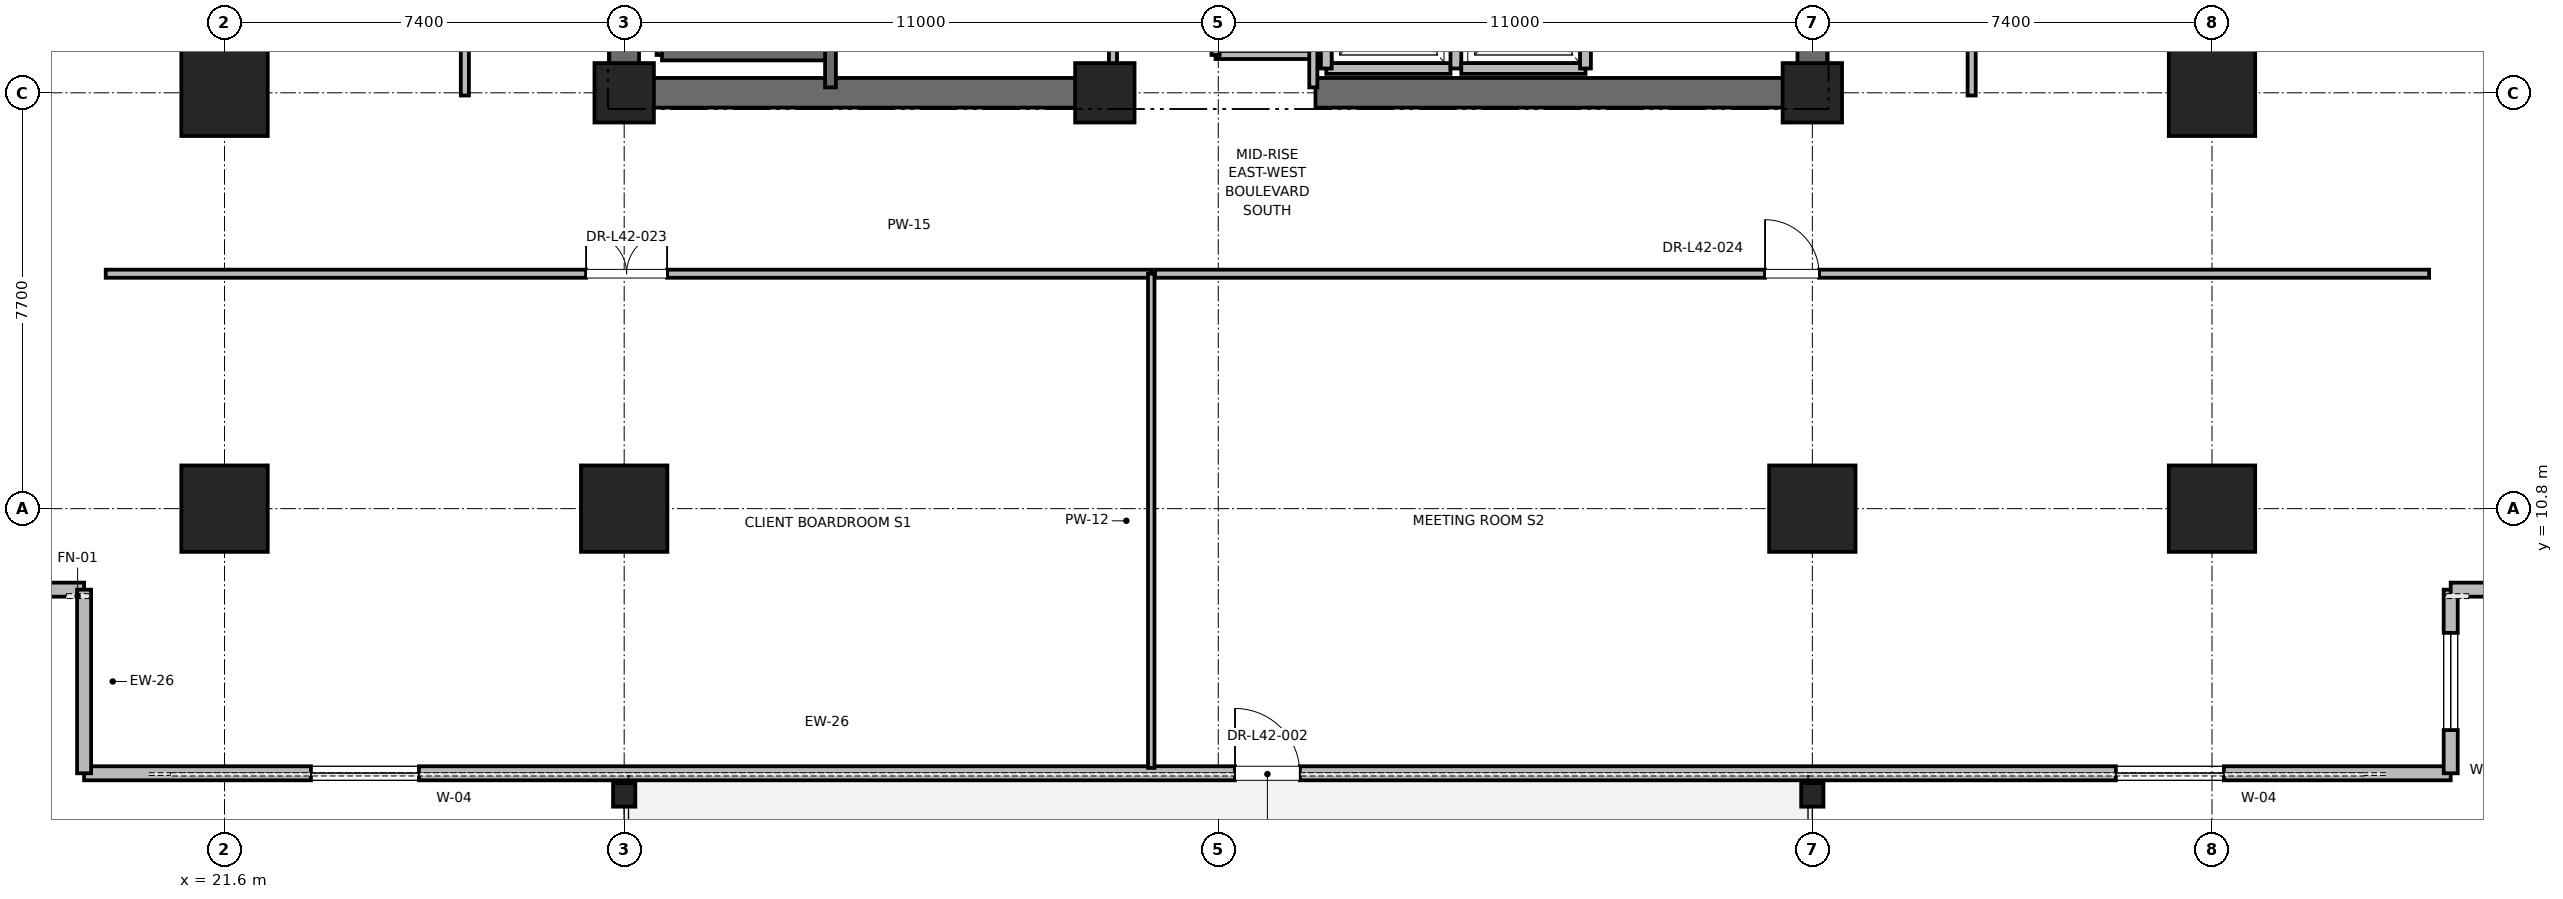
"""IFC4 building model, lengths in metres.
Left out: names, types, materials, properties, quantities, classifications, styles, units other than length and angle.
Written with IfcOpenShell. Run it as: python <this file> out.ifc"""

import sys

from ifc_helpers import new_model, si_unit, direction, frame, frame_2d, origin, origin_2d, place, context, subcontext, project, spatial, rectangle, i_section, extrude, element, fill, save


model = new_model("IFC4")
c1 = context("Model", 3, precision=1e-05, world=origin(), true_north=direction((0.0, 1.0)))
c2 = subcontext(c1, "Body", "Model", "MODEL_VIEW")
j1 = project(units=[si_unit("LENGTHUNIT", "METRE"), si_unit("PLANEANGLEUNIT", "RADIAN")], contexts=[c1])
p1 = place(None, origin())
s1 = spatial("IfcSite", under=j1, at=p1, CompositionType="ELEMENT")
p2 = place(p1, origin())
s2 = spatial("IfcBuilding", under=s1, at=p2, CompositionType="ELEMENT")
p3 = place(p2, frame((0.0, 0.0, 180.4)))
s3 = spatial("IfcBuildingStorey", under=s2, at=p3, CompositionType="ELEMENT", Elevation=180.4)
for number, where, z_axis, x_axis in (
    (1, (29.0, 10.8, 0.0), (0.0, 0.0, 1.0), (1.0, 0.0, 0.0)),
    (2, (51.0, 10.8, 0.0), (0.0, 0.0, 1.0), (1.0, 0.0, 0.0)),
    (3, (21.6, 18.5, 0.0), (0.0, 0.0, 1.0), (1.0, 0.0, 0.0)),
    (4, (58.4, 18.5, 0.0), (0.0, 0.0, 1.0), (1.0, 0.0, 0.0)),
    (5, (21.6, 10.8, 0.0), (0.0, 0.0, 1.0), (1.0, 0.0, 0.0)),
    (6, (58.4, 10.8, 0.0), (0.0, 0.0, 1.0), (1.0, 0.0, 0.0)),
):
    element("IfcColumn", number, at=place(p3, frame(where, z_axis=z_axis, x_axis=x_axis)), inside=s3, PredefinedType="COLUMN", context=c2, shape_type="SweptSolid", body=[
        extrude(rectangle(XDim=1.6, YDim=1.6, at=origin_2d()), origin(), (0.0, 0.0, 1.0), 4.0),
    ])
for number, where, z_axis, x_axis in (
    (7, (29.0, 5.5, 0.0), (0.0, 0.0, 1.0), (1.0, 0.0, 0.0)),
    (8, (51.0, 5.5, 0.0), (0.0, 0.0, 1.0), (1.0, 0.0, 0.0)),
):
    element("IfcColumn", number, at=place(p3, frame(where, z_axis=z_axis, x_axis=x_axis)), inside=s3, PredefinedType="COLUMN", context=c2, shape_type="SweptSolid", body=[
        extrude(i_section(OverallWidth=0.412, OverallDepth=0.437, WebThickness=0.036, FlangeThickness=0.058, FilletRadius=0.015, at=origin_2d()), origin(), (0.0, 0.0, 1.0), 4.0),
    ])
for number, where, z_axis, x_axis in (
    (9, (29.0, 18.5, 0.0), (0.0, 0.0, 1.0), (1.0, 0.0, 0.0)),
    (10, (51.0, 18.5, 0.0), (0.0, 0.0, 1.0), (1.0, 0.0, 0.0)),
    (11, (37.9, 18.5, 0.0), (0.0, 0.0, 1.0), (1.0, 0.0, 0.0)),
):
    element("IfcColumn", number, at=place(p3, frame(where, z_axis=z_axis, x_axis=x_axis)), inside=s3, PredefinedType="PILASTER", context=c2, shape_type="SweptSolid", body=[
        extrude(rectangle(XDim=1.1, YDim=1.1, at=origin_2d()), origin(), (0.0, 0.0, 1.0), 4.0),
    ])
for number, where, z_axis, x_axis in (
    (12, (29.0, 18.5, 0.0), (0.0, 0.0, 1.0), (1.0, 0.0, 0.0)),
    (13, (41.8, 18.5, 0.0), (0.0, 0.0, 1.0), (1.0, 0.0, 0.0)),
):
    element("IfcWall", number, at=place(p3, frame(where, z_axis=z_axis, x_axis=x_axis)), inside=s3, PredefinedType="SHEAR", context=c2, shape_type="SweptSolid", body=[
        extrude(rectangle(XDim=9.2, YDim=0.55, at=frame_2d((4.6, 0.0))), origin(), (0.0, 0.0, 1.0), 3.7),
    ])
p4 = place(p3, frame((29.0, 18.5, 0.0), z_axis=(0.0, 0.0, 1.0), x_axis=(0.0, 1.0, 0.0)))
e14 = element("IfcWall", 14, at=p4, inside=s3, PredefinedType="SHEAR", context=c2, shape_type="SweptSolid", body=[
    extrude(rectangle(XDim=8.8, YDim=0.55, at=frame_2d((4.4, 0.0))), origin(), (0.0, 0.0, 1.0), 3.7),
])
p5 = place(p3, frame((51.0, 18.5, 0.0), z_axis=(0.0, 0.0, 1.0), x_axis=(0.0, 1.0, 0.0)))
e15 = element("IfcWall", 15, at=p5, inside=s3, PredefinedType="SHEAR", context=c2, shape_type="SweptSolid", body=[
    extrude(rectangle(XDim=5.8, YDim=0.55, at=frame_2d((2.9, 0.0))), origin(), (0.0, 0.0, 1.0), 3.7),
])
p6 = place(p3, frame((19.0, 5.9, 0.0), z_axis=(0.0, 0.0, 1.0), x_axis=(1.0, 0.0, 0.0)))
e16 = element("IfcWall", 16, at=p6, inside=s3, PredefinedType="PARAPET", context=c2, shape_type="SweptSolid", body=[
    extrude(rectangle(XDim=43.82, YDim=0.26, at=frame_2d((21.91, 0.0))), origin(), (0.0, 0.0, 1.0), 2.91),
])
p7 = place(p6, frame((4.2, 0.0, 0.85)))
e17 = element("IfcOpeningElement", 17, at=p7, cuts=e16, PredefinedType="OPENING", context=c2, shape_type="SweptSolid", body=[
    extrude(rectangle(XDim=2.0, YDim=2.3, at=frame_2d((1.0, 1.15))), frame((0.0, 0.13, 0.0), z_axis=(0.0, -1.0, 0.0), x_axis=(1.0, 0.0, 0.0)), (0.0, 0.0, 1.0), 0.26),
])
p8 = place(p6, frame((21.31, 0.0, 0.0)))
e18 = element("IfcOpeningElement", 18, at=p8, cuts=e16, PredefinedType="OPENING", context=c2, shape_type="SweptSolid", body=[
    extrude(rectangle(XDim=1.2, YDim=2.2, at=frame_2d((0.6, 1.1))), frame((0.0, 0.13, 0.0), z_axis=(0.0, -1.0, 0.0), x_axis=(1.0, 0.0, 0.0)), (0.0, 0.0, 1.0), 0.26),
])
p9 = place(p6, frame((37.62, 0.0, 0.85)))
e19 = element("IfcOpeningElement", 19, at=p9, cuts=e16, PredefinedType="OPENING", context=c2, shape_type="SweptSolid", body=[
    extrude(rectangle(XDim=2.0, YDim=2.3, at=frame_2d((1.0, 1.15))), frame((0.0, 0.13, 0.0), z_axis=(0.0, -1.0, 0.0), x_axis=(1.0, 0.0, 0.0)), (0.0, 0.0, 1.0), 0.26),
])
p10 = place(p3, frame((15.2, 9.3, 0.0), z_axis=(0.0, 0.0, 1.0), x_axis=(1.0, 0.0, 0.0)))
e20 = element("IfcWall", 20, at=p10, inside=s3, PredefinedType="PARAPET", context=c2, shape_type="SweptSolid", body=[
    extrude(rectangle(XDim=3.8, YDim=0.26, at=frame_2d((1.9, 0.0))), origin(), (0.0, 0.0, 1.0), 3.7),
])
p11 = place(p10, frame((1.0, 0.0, 0.85)))
e21 = element("IfcOpeningElement", 21, at=p11, cuts=e20, PredefinedType="OPENING", context=c2, shape_type="SweptSolid", body=[
    extrude(rectangle(XDim=1.8, YDim=2.2, at=frame_2d((0.9, 1.1))), frame((0.0, 0.13, 0.0), z_axis=(0.0, -1.0, 0.0), x_axis=(1.0, 0.0, 0.0)), (0.0, 0.0, 1.0), 0.26),
])
p12 = place(p3, frame((19.0, 9.3, 0.0), z_axis=(0.0, 0.0, 1.0), x_axis=(0.0, -1.0, 0.0)))
e22 = element("IfcWall", 22, at=p12, inside=s3, PredefinedType="PARAPET", context=c2, shape_type="SweptSolid", body=[
    extrude(rectangle(XDim=3.4, YDim=0.26, at=frame_2d((1.7, 0.0))), origin(), (0.0, 0.0, 1.0), 3.7),
])
p13 = place(p3, frame((62.82, 5.9, 0.0), z_axis=(0.0, 0.0, 1.0), x_axis=(0.0, 1.0, 0.0)))
e23 = element("IfcWall", 23, at=p13, inside=s3, PredefinedType="PARAPET", context=c2, shape_type="SweptSolid", body=[
    extrude(rectangle(XDim=3.4, YDim=0.26, at=frame_2d((1.7, 0.0))), origin(), (0.0, 0.0, 1.0), 3.7),
])
p14 = place(p13, frame((0.8, 0.0, 0.85)))
e24 = element("IfcOpeningElement", 24, at=p14, cuts=e23, PredefinedType="OPENING", context=c2, shape_type="SweptSolid", body=[
    extrude(rectangle(XDim=1.8, YDim=2.2, at=frame_2d((0.9, 1.1))), frame((0.0, 0.13, 0.0), z_axis=(0.0, -1.0, 0.0), x_axis=(1.0, 0.0, 0.0)), (0.0, 0.0, 1.0), 0.26),
])
p15 = place(p3, frame((62.82, 9.3, 0.0), z_axis=(0.0, 0.0, 1.0), x_axis=(1.0, 0.0, 0.0)))
e25 = element("IfcWall", 25, at=p15, inside=s3, PredefinedType="PARAPET", context=c2, shape_type="SweptSolid", body=[
    extrude(rectangle(XDim=3.8, YDim=0.26, at=frame_2d((1.9, 0.0))), origin(), (0.0, 0.0, 1.0), 3.7),
])
p16 = place(p3, frame((29.7, 19.2, 0.0), z_axis=(0.0, 0.0, 1.0), x_axis=(0.0, 1.0, 0.0)))
e26 = element("IfcWall", 26, at=p16, inside=s3, PredefinedType="SOLIDWALL", context=c2, shape_type="SweptSolid", body=[
    extrude(rectangle(XDim=8.15, YDim=0.2, at=frame_2d((4.075, 0.0))), origin(), (0.0, 0.0, 1.0), 3.7),
])
p17 = place(p3, frame((29.7, 19.2, 0.0), z_axis=(0.0, 0.0, 1.0), x_axis=(1.0, 0.0, 0.0)))
e27 = element("IfcWall", 27, at=p17, inside=s3, PredefinedType="SOLIDWALL", context=c2, shape_type="SweptSolid", body=[
    extrude(rectangle(XDim=3.12, YDim=0.2, at=frame_2d((1.56, 0.0))), origin(), (0.0, 0.0, 1.0), 3.7),
])
p18 = place(p3, frame((32.82, 18.6, 0.0), z_axis=(0.0, 0.0, 1.0), x_axis=(0.0, 1.0, 0.0)))
e28 = element("IfcWall", 28, at=p18, inside=s3, PredefinedType="SOLIDWALL", context=c2, shape_type="SweptSolid", body=[
    extrude(rectangle(XDim=8.78, YDim=0.2, at=frame_2d((4.39, 0.0))), origin(), (0.0, 0.0, 1.0), 3.7),
])
p19 = place(p3, frame((42.0, 18.95, 0.0), z_axis=(0.0, 0.0, 1.0), x_axis=(1.0, 0.0, 0.0)))
e29 = element("IfcWall", 29, at=p19, inside=s3, PredefinedType="SOLIDWALL", context=c2, shape_type="SweptSolid", body=[
    extrude(rectangle(XDim=2.3, YDim=0.2, at=frame_2d((1.15, 0.0))), origin(), (0.0, 0.0, 1.0), 2.68),
])
p20 = place(p3, frame((42.0, 21.55, 0.0), z_axis=(0.0, 0.0, 1.0), x_axis=(0.0, -1.0, 0.0)))
e30 = element("IfcWall", 30, at=p20, inside=s3, PredefinedType="SOLIDWALL", context=c2, shape_type="SweptSolid", body=[
    extrude(rectangle(XDim=2.6, YDim=0.2, at=frame_2d((1.3, 0.0))), origin(), (0.0, 0.0, 1.0), 2.68),
])
p21 = place(p3, frame((44.4, 18.95, 0.0), z_axis=(0.0, 0.0, 1.0), x_axis=(0.0, 1.0, 0.0)))
e31 = element("IfcWall", 31, at=p21, inside=s3, PredefinedType="SOLIDWALL", context=c2, shape_type="SweptSolid", body=[
    extrude(rectangle(XDim=2.6, YDim=0.2, at=frame_2d((1.3, 0.0))), origin(), (0.0, 0.0, 1.0), 3.7),
])
p22 = place(p3, frame((44.5, 18.95, 0.0), z_axis=(0.0, 0.0, 1.0), x_axis=(1.0, 0.0, 0.0)))
e32 = element("IfcWall", 32, at=p22, inside=s3, PredefinedType="SOLIDWALL", context=c2, shape_type="SweptSolid", body=[
    extrude(rectangle(XDim=2.3, YDim=0.2, at=frame_2d((1.15, 0.0))), origin(), (0.0, 0.0, 1.0), 3.7),
])
p23 = place(p3, frame((46.8, 18.95, 0.0), z_axis=(0.0, 0.0, 1.0), x_axis=(0.0, 1.0, 0.0)))
e33 = element("IfcWall", 33, at=p23, inside=s3, PredefinedType="SOLIDWALL", context=c2, shape_type="SweptSolid", body=[
    extrude(rectangle(XDim=2.6, YDim=0.2, at=frame_2d((1.3, 0.0))), origin(), (0.0, 0.0, 1.0), 3.7),
])
p24 = place(p3, frame((39.95, 19.2, 0.0), z_axis=(0.0, 0.0, 1.0), x_axis=(1.0, 0.0, 0.0)))
e34 = element("IfcWall", 34, at=p24, inside=s3, PredefinedType="PARTITIONING", context=c2, shape_type="SweptSolid", body=[
    extrude(rectangle(XDim=1.81, YDim=0.15, at=frame_2d((0.905, 0.0))), origin(), (0.0, 0.0, 1.0), 2.85),
])
p25 = place(p3, frame((41.76, 18.6, 0.0), z_axis=(0.0, 0.0, 1.0), x_axis=(0.0, 1.0, 0.0)))
e35 = element("IfcWall", 35, at=p25, inside=s3, PredefinedType="PARTITIONING", context=c2, shape_type="SweptSolid", body=[
    extrude(rectangle(XDim=3.6, YDim=0.15, at=frame_2d((1.8, 0.0))), origin(), (0.0, 0.0, 1.0), 2.68),
])
p26 = place(p3, frame((39.95, 19.2, 0.0), z_axis=(0.0, 0.0, 1.0), x_axis=(0.0, 1.0, 0.0)))
e36 = element("IfcWall", 36, at=p26, inside=s3, PredefinedType="PARTITIONING", context=c2, shape_type="SweptSolid", body=[
    extrude(rectangle(XDim=3.0, YDim=0.15, at=frame_2d((1.5, 0.0))), origin(), (0.0, 0.0, 1.0), 2.85),
])
p27 = place(p26, frame((1.05, 0.0, 0.0)))
e37 = element("IfcOpeningElement", 37, at=p27, cuts=e36, PredefinedType="OPENING", context=c2, shape_type="SweptSolid", body=[
    extrude(rectangle(XDim=0.9, YDim=2.1, at=frame_2d((0.45, 1.05))), frame((0.0, 0.075, 0.0), z_axis=(0.0, -1.0, 0.0), x_axis=(1.0, 0.0, 0.0)), (0.0, 0.0, 1.0), 0.15),
])
p28 = place(p3, frame((38.05, 18.6, 0.0), z_axis=(0.0, 0.0, 1.0), x_axis=(0.0, 1.0, 0.0)))
e38 = element("IfcWall", 38, at=p28, inside=s3, PredefinedType="PARTITIONING", context=c2, shape_type="SweptSolid", body=[
    extrude(rectangle(XDim=4.46, YDim=0.15, at=frame_2d((2.23, 0.0))), origin(), (0.0, 0.0, 1.0), 2.68),
])
p29 = place(p28, frame((1.73, 0.0, 0.0)))
e39 = element("IfcOpeningElement", 39, at=p29, cuts=e38, PredefinedType="OPENING", context=c2, shape_type="SweptSolid", body=[
    extrude(rectangle(XDim=1.0, YDim=2.15, at=frame_2d((0.5, 1.075))), frame((0.0, 0.075, 0.0), z_axis=(0.0, -1.0, 0.0), x_axis=(1.0, 0.0, 0.0)), (0.0, 0.0, 1.0), 0.15),
])
p30 = place(p3, frame((19.4, 15.15, 0.0), z_axis=(0.0, 0.0, 1.0), x_axis=(1.0, 0.0, 0.0)))
e40 = element("IfcWall", 40, at=p30, inside=s3, PredefinedType="PARTITIONING", context=c2, shape_type="SweptSolid", body=[
    extrude(rectangle(XDim=19.359, YDim=0.15, at=frame_2d((9.68, 0.0))), origin(), (0.0, 0.0, 1.0), 2.85),
])
p31 = place(p30, frame((8.895, 0.0, 0.0)))
e41 = element("IfcOpeningElement", 41, at=p31, cuts=e40, PredefinedType="OPENING", context=c2, shape_type="SweptSolid", body=[
    extrude(rectangle(XDim=1.5, YDim=2.25, at=frame_2d((0.75, 1.125))), frame((0.0, 0.075, 0.0), z_axis=(0.0, -1.0, 0.0), x_axis=(1.0, 0.0, 0.0)), (0.0, 0.0, 1.0), 0.15),
])
p32 = place(p3, frame((38.759, 6.0, 0.0), z_axis=(0.0, 0.0, 1.0), x_axis=(0.0, 1.0, 0.0)))
e42 = element("IfcWall", 42, at=p32, inside=s3, PredefinedType="PARTITIONING", context=c2, shape_type="SweptSolid", body=[
    extrude(rectangle(XDim=9.15, YDim=0.12, at=frame_2d((4.575, 0.0))), origin(), (0.0, 0.0, 1.0), 2.33),
])
p33 = place(p3, frame((38.829, 15.15, 0.0), z_axis=(0.0, 0.0, 1.0), x_axis=(1.0, 0.0, 0.0)))
e43 = element("IfcWall", 43, at=p33, inside=s3, PredefinedType="PARTITIONING", context=c2, shape_type="SweptSolid", body=[
    extrude(rectangle(XDim=23.591, YDim=0.15, at=frame_2d((11.795, 0.0))), origin(), (0.0, 0.0, 1.0), 2.85),
])
p34 = place(p33, frame((11.295, 0.0, 0.0)))
e44 = element("IfcOpeningElement", 44, at=p34, cuts=e43, PredefinedType="OPENING", context=c2, shape_type="SweptSolid", body=[
    extrude(rectangle(XDim=1.0, YDim=2.15, at=frame_2d((0.5, 1.075))), frame((0.0, 0.075, 0.0), z_axis=(0.0, -1.0, 0.0), x_axis=(1.0, 0.0, 0.0)), (0.0, 0.0, 1.0), 0.15),
])
p35 = place(p3, frame((26.05, 18.45, 0.0), z_axis=(0.0, 0.0, 1.0), x_axis=(0.0, 1.0, 0.0)))
e45 = element("IfcWall", 45, at=p35, inside=s3, PredefinedType="PARTITIONING", context=c2, shape_type="SweptSolid", body=[
    extrude(rectangle(XDim=18.1, YDim=0.15, at=frame_2d((9.05, 0.0))), origin(), (0.0, 0.0, 1.0), 2.85),
])
p36 = place(p35, frame((8.55, 0.0, 0.0)))
e46 = element("IfcOpeningElement", 46, at=p36, cuts=e45, PredefinedType="OPENING", context=c2, shape_type="SweptSolid", body=[
    extrude(rectangle(XDim=1.0, YDim=2.15, at=frame_2d((0.5, 1.075))), frame((0.0, 0.075, 0.0), z_axis=(0.0, -1.0, 0.0), x_axis=(1.0, 0.0, 0.0)), (0.0, 0.0, 1.0), 0.15),
])
p37 = place(p3, frame((53.95, 18.45, 0.0), z_axis=(0.0, 0.0, 1.0), x_axis=(0.0, 1.0, 0.0)))
e47 = element("IfcWall", 47, at=p37, inside=s3, PredefinedType="PARTITIONING", context=c2, shape_type="SweptSolid", body=[
    extrude(rectangle(XDim=7.602, YDim=0.15, at=frame_2d((3.801, 0.0))), origin(), (0.0, 0.0, 1.0), 2.85),
])
p38 = place(p37, frame((3.341, 0.0, 0.0)))
e48 = element("IfcOpeningElement", 48, at=p38, cuts=e47, PredefinedType="OPENING", context=c2, shape_type="SweptSolid", body=[
    extrude(rectangle(XDim=1.0, YDim=2.15, at=frame_2d((0.5, 1.075))), frame((0.0, 0.075, 0.0), z_axis=(0.0, -1.0, 0.0), x_axis=(1.0, 0.0, 0.0)), (0.0, 0.0, 1.0), 0.15),
])
p39 = place(p7, origin())
e49 = element("IfcWindow", 49, at=p39, inside=s3, PartitioningType="SINGLE_PANEL", PredefinedType="WINDOW", context=c2, shape_type="SweptSolid", body=[
    extrude(rectangle(XDim=2.0, YDim=2.3, at=frame_2d((1.0, 1.15))), frame((0.0, 0.03, 0.0), z_axis=(0.0, -1.0, 0.0), x_axis=(1.0, 0.0, 0.0)), (0.0, 0.0, 1.0), 0.06),
])
fill(e17, e49)
p40 = place(p8, origin())
e50 = element("IfcDoor", 50, at=p40, inside=s3, OperationType="SINGLE_SWING_LEFT", PredefinedType="DOOR", context=c2, shape_type="SweptSolid", body=[
    extrude(rectangle(XDim=1.2, YDim=2.2, at=frame_2d((0.6, 1.1))), frame((0.0, 0.025, 0.0), z_axis=(0.0, -1.0, 0.0), x_axis=(1.0, 0.0, 0.0)), (0.0, 0.0, 1.0), 0.05),
])
fill(e18, e50)
p41 = place(p9, origin())
e51 = element("IfcWindow", 51, at=p41, inside=s3, PartitioningType="SINGLE_PANEL", PredefinedType="WINDOW", context=c2, shape_type="SweptSolid", body=[
    extrude(rectangle(XDim=2.0, YDim=2.3, at=frame_2d((1.0, 1.15))), frame((0.0, 0.03, 0.0), z_axis=(0.0, -1.0, 0.0), x_axis=(1.0, 0.0, 0.0)), (0.0, 0.0, 1.0), 0.06),
])
fill(e19, e51)
p42 = place(p14, origin())
e52 = element("IfcWindow", 52, at=p42, inside=s3, PartitioningType="SINGLE_PANEL", PredefinedType="WINDOW", context=c2, shape_type="SweptSolid", body=[
    extrude(rectangle(XDim=1.8, YDim=2.2, at=frame_2d((0.9, 1.1))), frame((0.0, 0.03, 0.0), z_axis=(0.0, -1.0, 0.0), x_axis=(1.0, 0.0, 0.0)), (0.0, 0.0, 1.0), 0.06),
])
fill(e24, e52)
p43 = place(p31, origin())
e53 = element("IfcDoor", 53, at=p43, inside=s3, OperationType="DOUBLE_DOOR_SINGLE_SWING", PredefinedType="DOOR", context=c2, shape_type="SweptSolid", body=[
    extrude(rectangle(XDim=1.5, YDim=2.25, at=frame_2d((0.75, 1.125))), frame((0.0, 0.025, 0.0), z_axis=(0.0, -1.0, 0.0), x_axis=(1.0, 0.0, 0.0)), (0.0, 0.0, 1.0), 0.05),
])
fill(e41, e53)
p44 = place(p34, origin())
e54 = element("IfcDoor", 54, at=p44, inside=s3, OperationType="SINGLE_SWING_LEFT", PredefinedType="DOOR", context=c2, shape_type="SweptSolid", body=[
    extrude(rectangle(XDim=1.0, YDim=2.15, at=frame_2d((0.5, 1.075))), frame((0.0, 0.025, 0.0), z_axis=(0.0, -1.0, 0.0), x_axis=(1.0, 0.0, 0.0)), (0.0, 0.0, 1.0), 0.05),
])
fill(e44, e54)
save(model, sys.argv[1])
